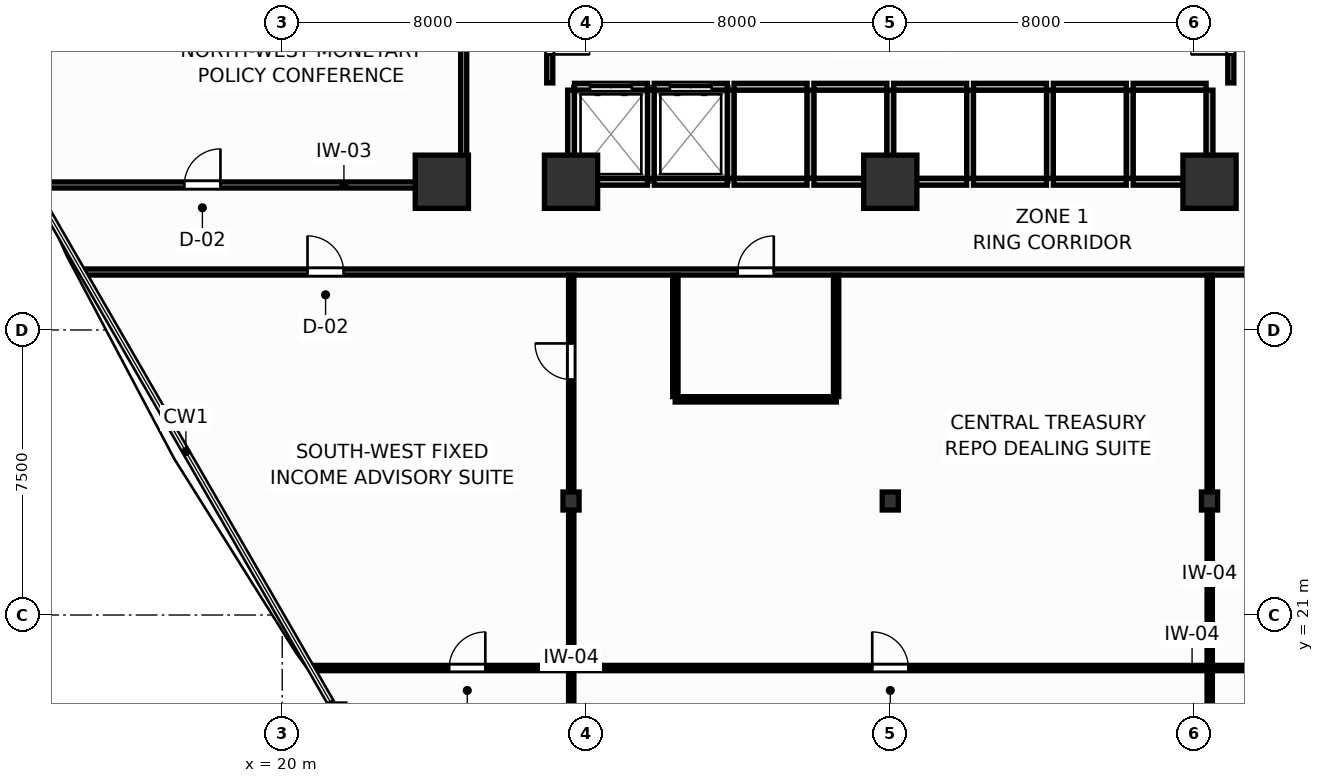
"""IFC4 building model, lengths in metres.
Left out: names, types, materials, properties, quantities, classifications, styles, units other than length and angle.
Written with IfcOpenShell. Run it as: python <this file> out.ifc"""

import sys

from ifc_helpers import new_model, si_unit, direction, frame, frame_2d, origin, origin_2d, place, context, subcontext, project, spatial, rectangle, i_section, extrude, source, transform, mapped, element, fill, save


model = new_model("IFC4")
c1 = context("Model", 3, precision=1e-05, world=origin(), true_north=direction((0.0, 1.0)))
c2 = subcontext(c1, "Body", "Model", "MODEL_VIEW")
j1 = project(units=[si_unit("LENGTHUNIT", "METRE"), si_unit("PLANEANGLEUNIT", "RADIAN")], contexts=[c1])
p1 = place(None, origin())
s1 = spatial("IfcSite", under=j1, at=p1, CompositionType="ELEMENT")
p2 = place(p1, origin())
s2 = spatial("IfcBuilding", under=s1, at=p2, CompositionType="ELEMENT")
p3 = place(p2, frame((0.0, 0.0, 43.5)))
s3 = spatial("IfcBuildingStorey", under=s2, at=p3, CompositionType="ELEMENT", Elevation=43.5)
m1 = source(origin(), c2, "Body", "SweptSolid", [
    extrude(rectangle(XDim=1.4, YDim=1.4, at=origin_2d()), origin(), (0.0, 0.0, 1.0), 3.9),
])
for number, where, z_axis, x_axis in (
    (1, (27.6, 32.4, 0.0), (0.0, 0.0, 1.0), (1.0, 0.0, 0.0)),
    (2, (44.4, 32.4, 0.0), (0.0, 0.0, 1.0), (1.0, 0.0, 0.0)),
    (3, (36.0, 32.4, 0.0), (0.0, 0.0, 1.0), (1.0, 0.0, 0.0)),
    (4, (24.2, 32.4, 0.0), (0.0, 0.0, 1.0), (1.0, 0.0, 0.0)),
):
    element("IfcColumn", number, at=place(p3, frame(where, z_axis=z_axis, x_axis=x_axis)), inside=s3, PredefinedType="COLUMN", context=c2, shape_type="MappedRepresentation", body=[
        mapped(m1, transform((0.0, 0.0, 0.0), scale=1.0)),
    ])
m2 = source(origin(), c2, "Body", "SweptSolid", [
    extrude(i_section(OverallWidth=0.424, OverallDepth=0.474, WebThickness=0.045, FlangeThickness=0.072, FilletRadius=0.015, at=origin_2d()), origin(), (0.0, 0.0, 1.0), 3.9),
])
for number, where, z_axis, x_axis in (
    (5, (27.6, 24.0, 0.0), (0.0, 0.0, 1.0), (1.0, 0.0, 0.0)),
    (6, (44.4, 24.0, 0.0), (0.0, 0.0, 1.0), (1.0, 0.0, 0.0)),
    (7, (36.0, 24.0, 0.0), (0.0, 0.0, 1.0), (1.0, 0.0, 0.0)),
):
    element("IfcColumn", number, at=place(p3, frame(where, z_axis=z_axis, x_axis=x_axis)), inside=s3, PredefinedType="COLUMN", context=c2, shape_type="MappedRepresentation", body=[
        mapped(m2, transform((0.0, 0.0, 0.0), scale=1.0)),
    ])
p4 = place(p3, frame((27.69, 34.9, 0.0), z_axis=(0.0, 0.0, 1.0), x_axis=(1.0, 0.0, 0.0)))
e8 = element("IfcWall", 8, at=p4, inside=s3, PredefinedType="PARTITIONING", context=c2, shape_type="SweptSolid", body=[
    extrude(rectangle(XDim=1.92, YDim=0.18, at=frame_2d((0.96, 0.0))), origin(), (0.0, 0.0, 1.0), 3.68),
])
p5 = place(p4, frame((0.41, 0.0, 0.0)))
e9 = element("IfcOpeningElement", 9, at=p5, cuts=e8, PredefinedType="OPENING", context=c2, shape_type="SweptSolid", body=[
    extrude(rectangle(XDim=1.1, YDim=2.1, at=frame_2d((0.55, 1.05))), frame((0.0, 0.1, 0.0), z_axis=(0.0, -1.0, 0.0), x_axis=(1.0, 0.0, 0.0)), (0.0, 0.0, 1.0), 0.2),
])
p6 = place(p3, frame((27.69, 32.4, 0.0), z_axis=(0.0, 0.0, 1.0), x_axis=(1.0, 0.0, 0.0)))
e10 = element("IfcWall", 10, at=p6, inside=s3, PredefinedType="PARTITIONING", context=c2, shape_type="SweptSolid", body=[
    extrude(rectangle(XDim=1.92, YDim=0.18, at=frame_2d((0.96, 0.0))), origin(), (0.0, 0.0, 1.0), 2.24),
])
p7 = place(p3, frame((27.6, 32.49, 0.0), z_axis=(0.0, 0.0, 1.0), x_axis=(0.0, 1.0, 0.0)))
e11 = element("IfcWall", 11, at=p7, inside=s3, PredefinedType="PARTITIONING", context=c2, shape_type="SweptSolid", body=[
    extrude(rectangle(XDim=2.32, YDim=0.18, at=frame_2d((1.16, 0.0))), origin(), (0.0, 0.0, 1.0), 3.68),
])
p8 = place(p3, frame((29.79, 34.9, 0.0), z_axis=(0.0, 0.0, 1.0), x_axis=(1.0, 0.0, 0.0)))
e12 = element("IfcWall", 12, at=p8, inside=s3, PredefinedType="PARTITIONING", context=c2, shape_type="SweptSolid", body=[
    extrude(rectangle(XDim=1.92, YDim=0.18, at=frame_2d((0.96, 0.0))), origin(), (0.0, 0.0, 1.0), 3.68),
])
p9 = place(p8, frame((0.41, 0.0, 0.0)))
e13 = element("IfcOpeningElement", 13, at=p9, cuts=e12, PredefinedType="OPENING", context=c2, shape_type="SweptSolid", body=[
    extrude(rectangle(XDim=1.1, YDim=2.1, at=frame_2d((0.55, 1.05))), frame((0.0, 0.1, 0.0), z_axis=(0.0, -1.0, 0.0), x_axis=(1.0, 0.0, 0.0)), (0.0, 0.0, 1.0), 0.2),
])
p10 = place(p3, frame((29.79, 32.4, 0.0), z_axis=(0.0, 0.0, 1.0), x_axis=(1.0, 0.0, 0.0)))
e14 = element("IfcWall", 14, at=p10, inside=s3, PredefinedType="PARTITIONING", context=c2, shape_type="SweptSolid", body=[
    extrude(rectangle(XDim=1.92, YDim=0.18, at=frame_2d((0.96, 0.0))), origin(), (0.0, 0.0, 1.0), 2.24),
])
p11 = place(p3, frame((29.7, 32.49, 0.0), z_axis=(0.0, 0.0, 1.0), x_axis=(0.0, 1.0, 0.0)))
e15 = element("IfcWall", 15, at=p11, inside=s3, PredefinedType="PARTITIONING", context=c2, shape_type="SweptSolid", body=[
    extrude(rectangle(XDim=2.32, YDim=0.18, at=frame_2d((1.16, 0.0))), origin(), (0.0, 0.0, 1.0), 3.68),
])
p12 = place(p3, frame((31.89, 34.9, 0.0), z_axis=(0.0, 0.0, 1.0), x_axis=(1.0, 0.0, 0.0)))
e16 = element("IfcWall", 16, at=p12, inside=s3, PredefinedType="PARTITIONING", context=c2, shape_type="SweptSolid", body=[
    extrude(rectangle(XDim=1.92, YDim=0.18, at=frame_2d((0.96, 0.0))), origin(), (0.0, 0.0, 1.0), 3.68),
])
p13 = place(p3, frame((31.89, 32.4, 0.0), z_axis=(0.0, 0.0, 1.0), x_axis=(1.0, 0.0, 0.0)))
e17 = element("IfcWall", 17, at=p13, inside=s3, PredefinedType="PARTITIONING", context=c2, shape_type="SweptSolid", body=[
    extrude(rectangle(XDim=1.92, YDim=0.18, at=frame_2d((0.96, 0.0))), origin(), (0.0, 0.0, 1.0), 2.24),
])
p14 = place(p3, frame((31.8, 32.49, 0.0), z_axis=(0.0, 0.0, 1.0), x_axis=(0.0, 1.0, 0.0)))
e18 = element("IfcWall", 18, at=p14, inside=s3, PredefinedType="PARTITIONING", context=c2, shape_type="SweptSolid", body=[
    extrude(rectangle(XDim=2.32, YDim=0.18, at=frame_2d((1.16, 0.0))), origin(), (0.0, 0.0, 1.0), 3.68),
])
p15 = place(p3, frame((33.99, 34.9, 0.0), z_axis=(0.0, 0.0, 1.0), x_axis=(1.0, 0.0, 0.0)))
e19 = element("IfcWall", 19, at=p15, inside=s3, PredefinedType="PARTITIONING", context=c2, shape_type="SweptSolid", body=[
    extrude(rectangle(XDim=1.92, YDim=0.18, at=frame_2d((0.96, 0.0))), origin(), (0.0, 0.0, 1.0), 3.68),
])
p16 = place(p3, frame((33.99, 32.4, 0.0), z_axis=(0.0, 0.0, 1.0), x_axis=(1.0, 0.0, 0.0)))
e20 = element("IfcWall", 20, at=p16, inside=s3, PredefinedType="PARTITIONING", context=c2, shape_type="SweptSolid", body=[
    extrude(rectangle(XDim=1.92, YDim=0.18, at=frame_2d((0.96, 0.0))), origin(), (0.0, 0.0, 1.0), 2.24),
])
p17 = place(p3, frame((33.9, 32.49, 0.0), z_axis=(0.0, 0.0, 1.0), x_axis=(0.0, 1.0, 0.0)))
e21 = element("IfcWall", 21, at=p17, inside=s3, PredefinedType="PARTITIONING", context=c2, shape_type="SweptSolid", body=[
    extrude(rectangle(XDim=2.32, YDim=0.18, at=frame_2d((1.16, 0.0))), origin(), (0.0, 0.0, 1.0), 3.68),
])
p18 = place(p3, frame((36.09, 34.9, 0.0), z_axis=(0.0, 0.0, 1.0), x_axis=(1.0, 0.0, 0.0)))
e22 = element("IfcWall", 22, at=p18, inside=s3, PredefinedType="PARTITIONING", context=c2, shape_type="SweptSolid", body=[
    extrude(rectangle(XDim=1.92, YDim=0.18, at=frame_2d((0.96, 0.0))), origin(), (0.0, 0.0, 1.0), 3.68),
])
p19 = place(p3, frame((36.09, 32.4, 0.0), z_axis=(0.0, 0.0, 1.0), x_axis=(1.0, 0.0, 0.0)))
e23 = element("IfcWall", 23, at=p19, inside=s3, PredefinedType="PARTITIONING", context=c2, shape_type="SweptSolid", body=[
    extrude(rectangle(XDim=1.92, YDim=0.18, at=frame_2d((0.96, 0.0))), origin(), (0.0, 0.0, 1.0), 2.24),
])
p20 = place(p3, frame((36.0, 32.49, 0.0), z_axis=(0.0, 0.0, 1.0), x_axis=(0.0, 1.0, 0.0)))
e24 = element("IfcWall", 24, at=p20, inside=s3, PredefinedType="PARTITIONING", context=c2, shape_type="SweptSolid", body=[
    extrude(rectangle(XDim=2.32, YDim=0.18, at=frame_2d((1.16, 0.0))), origin(), (0.0, 0.0, 1.0), 3.68),
])
p21 = place(p3, frame((38.19, 34.9, 0.0), z_axis=(0.0, 0.0, 1.0), x_axis=(1.0, 0.0, 0.0)))
e25 = element("IfcWall", 25, at=p21, inside=s3, PredefinedType="PARTITIONING", context=c2, shape_type="SweptSolid", body=[
    extrude(rectangle(XDim=1.92, YDim=0.18, at=frame_2d((0.96, 0.0))), origin(), (0.0, 0.0, 1.0), 3.68),
])
p22 = place(p3, frame((38.19, 32.4, 0.0), z_axis=(0.0, 0.0, 1.0), x_axis=(1.0, 0.0, 0.0)))
e26 = element("IfcWall", 26, at=p22, inside=s3, PredefinedType="PARTITIONING", context=c2, shape_type="SweptSolid", body=[
    extrude(rectangle(XDim=1.92, YDim=0.18, at=frame_2d((0.96, 0.0))), origin(), (0.0, 0.0, 1.0), 2.24),
])
p23 = place(p3, frame((38.1, 32.49, 0.0), z_axis=(0.0, 0.0, 1.0), x_axis=(0.0, 1.0, 0.0)))
e27 = element("IfcWall", 27, at=p23, inside=s3, PredefinedType="PARTITIONING", context=c2, shape_type="SweptSolid", body=[
    extrude(rectangle(XDim=2.32, YDim=0.18, at=frame_2d((1.16, 0.0))), origin(), (0.0, 0.0, 1.0), 3.68),
])
p24 = place(p3, frame((40.29, 34.9, 0.0), z_axis=(0.0, 0.0, 1.0), x_axis=(1.0, 0.0, 0.0)))
e28 = element("IfcWall", 28, at=p24, inside=s3, PredefinedType="PARTITIONING", context=c2, shape_type="SweptSolid", body=[
    extrude(rectangle(XDim=1.92, YDim=0.18, at=frame_2d((0.96, 0.0))), origin(), (0.0, 0.0, 1.0), 3.68),
])
p25 = place(p3, frame((40.29, 32.4, 0.0), z_axis=(0.0, 0.0, 1.0), x_axis=(1.0, 0.0, 0.0)))
e29 = element("IfcWall", 29, at=p25, inside=s3, PredefinedType="PARTITIONING", context=c2, shape_type="SweptSolid", body=[
    extrude(rectangle(XDim=1.92, YDim=0.18, at=frame_2d((0.96, 0.0))), origin(), (0.0, 0.0, 1.0), 2.24),
])
p26 = place(p3, frame((40.2, 32.49, 0.0), z_axis=(0.0, 0.0, 1.0), x_axis=(0.0, 1.0, 0.0)))
e30 = element("IfcWall", 30, at=p26, inside=s3, PredefinedType="PARTITIONING", context=c2, shape_type="SweptSolid", body=[
    extrude(rectangle(XDim=2.32, YDim=0.18, at=frame_2d((1.16, 0.0))), origin(), (0.0, 0.0, 1.0), 3.68),
])
p27 = place(p3, frame((42.39, 34.9, 0.0), z_axis=(0.0, 0.0, 1.0), x_axis=(1.0, 0.0, 0.0)))
e31 = element("IfcWall", 31, at=p27, inside=s3, PredefinedType="PARTITIONING", context=c2, shape_type="SweptSolid", body=[
    extrude(rectangle(XDim=1.92, YDim=0.18, at=frame_2d((0.96, 0.0))), origin(), (0.0, 0.0, 1.0), 3.68),
])
p28 = place(p3, frame((42.39, 32.4, 0.0), z_axis=(0.0, 0.0, 1.0), x_axis=(1.0, 0.0, 0.0)))
e32 = element("IfcWall", 32, at=p28, inside=s3, PredefinedType="PARTITIONING", context=c2, shape_type="SweptSolid", body=[
    extrude(rectangle(XDim=1.92, YDim=0.18, at=frame_2d((0.96, 0.0))), origin(), (0.0, 0.0, 1.0), 2.24),
])
for number, where, z_axis, x_axis in (
    (33, (42.3, 32.49, 0.0), (0.0, 0.0, 1.0), (0.0, 1.0, 0.0)),
    (34, (44.4, 32.49, 0.0), (0.0, 0.0, 1.0), (0.0, 1.0, 0.0)),
):
    element("IfcWall", number, at=place(p3, frame(where, z_axis=z_axis, x_axis=x_axis)), inside=s3, PredefinedType="PARTITIONING", context=c2, shape_type="SweptSolid", body=[
        extrude(rectangle(XDim=2.32, YDim=0.18, at=frame_2d((1.16, 0.0))), origin(), (0.0, 0.0, 1.0), 3.68),
    ])
p29 = place(p3, frame((27.04, 35.0, 0.0), z_axis=(0.0, 0.0, 1.0), x_axis=(0.0, 1.0, 0.0)))
e35 = element("IfcWall", 35, at=p29, inside=s3, PredefinedType="PARTITIONING", context=c2, shape_type="SweptSolid", body=[
    extrude(rectangle(XDim=2.65, YDim=0.16, at=frame_2d((1.325, 0.0))), origin(), (0.0, 0.0, 1.0), 3.68),
])
p30 = place(p29, frame((0.75, 0.0, 0.0)))
e36 = element("IfcOpeningElement", 36, at=p30, cuts=e35, PredefinedType="OPENING", context=c2, shape_type="SweptSolid", body=[
    extrude(rectangle(XDim=1.05, YDim=2.1, at=frame_2d((0.525, 1.05))), frame((0.0, 0.09, 0.0), z_axis=(0.0, -1.0, 0.0), x_axis=(1.0, 0.0, 0.0)), (0.0, 0.0, 1.0), 0.18),
])
p31 = place(p3, frame((44.96, 35.0, 0.0), z_axis=(0.0, 0.0, 1.0), x_axis=(0.0, 1.0, 0.0)))
e37 = element("IfcWall", 37, at=p31, inside=s3, PredefinedType="PARTITIONING", context=c2, shape_type="SweptSolid", body=[
    extrude(rectangle(XDim=2.65, YDim=0.16, at=frame_2d((1.325, 0.0))), origin(), (0.0, 0.0, 1.0), 3.68),
])
p32 = place(p31, frame((0.75, 0.0, 0.0)))
e38 = element("IfcOpeningElement", 38, at=p32, cuts=e37, PredefinedType="OPENING", context=c2, shape_type="SweptSolid", body=[
    extrude(rectangle(XDim=1.05, YDim=2.1, at=frame_2d((0.525, 1.05))), frame((0.0, 0.09, 0.0), z_axis=(0.0, -1.0, 0.0), x_axis=(1.0, 0.0, 0.0)), (0.0, 0.0, 1.0), 0.18),
])
p33 = place(p3, frame((14.757, 30.025, 0.0), z_axis=(0.0, 0.0, 1.0), x_axis=(1.0, 0.0, 0.0)))
e39 = element("IfcWall", 39, at=p33, inside=s3, PredefinedType="PARTITIONING", context=c2, shape_type="SweptSolid", body=[
    extrude(rectangle(XDim=42.485, YDim=0.16, at=frame_2d((21.243, 0.0))), origin(), (0.0, 0.0, 1.0), 3.68),
])
p34 = place(p33, frame((17.228, 0.0, 0.0)))
e40 = element("IfcOpeningElement", 40, at=p34, cuts=e39, PredefinedType="OPENING", context=c2, shape_type="SweptSolid", body=[
    extrude(rectangle(XDim=0.95, YDim=2.05, at=frame_2d((0.475, 1.025))), frame((0.0, 0.09, 0.0), z_axis=(0.0, -1.0, 0.0), x_axis=(1.0, 0.0, 0.0)), (0.0, 0.0, 1.0), 0.18),
])
p35 = place(p33, frame((5.908, 0.0, 0.0)))
e41 = element("IfcOpeningElement", 41, at=p35, cuts=e39, PredefinedType="OPENING", context=c2, shape_type="SweptSolid", body=[
    extrude(rectangle(XDim=0.95, YDim=2.05, at=frame_2d((0.475, 1.025))), frame((0.0, 0.09, 0.0), z_axis=(0.0, -1.0, 0.0), x_axis=(1.0, 0.0, 0.0)), (0.0, 0.0, 1.0), 0.18),
])
p36 = place(p33, frame((35.199, 0.0, 0.0)))
e42 = element("IfcOpeningElement", 42, at=p36, cuts=e39, PredefinedType="OPENING", context=c2, shape_type="SweptSolid", body=[
    extrude(rectangle(XDim=0.95, YDim=2.05, at=frame_2d((0.475, 1.025))), frame((0.0, 0.09, 0.0), z_axis=(0.0, -1.0, 0.0), x_axis=(1.0, 0.0, 0.0)), (0.0, 0.0, 1.0), 0.18),
])
p37 = place(p3, frame((24.775, 32.31, 0.0), z_axis=(0.0, 0.0, 1.0), x_axis=(0.0, 1.0, 0.0)))
e43 = element("IfcWall", 43, at=p37, inside=s3, PredefinedType="PARTITIONING", context=c2, shape_type="SweptSolid", body=[
    extrude(rectangle(XDim=24.519, YDim=0.16, at=frame_2d((12.26, 0.0))), origin(), (0.0, 0.0, 1.0), 3.68),
])
p38 = place(p37, frame((11.654, 0.0, 0.0)))
e44 = element("IfcOpeningElement", 44, at=p38, cuts=e43, PredefinedType="OPENING", context=c2, shape_type="SweptSolid", body=[
    extrude(rectangle(XDim=0.95, YDim=2.05, at=frame_2d((0.475, 1.025))), frame((0.0, 0.09, 0.0), z_axis=(0.0, -1.0, 0.0), x_axis=(1.0, 0.0, 0.0)), (0.0, 0.0, 1.0), 0.18),
])
p39 = place(p3, frame((13.463, 32.315, 0.0), z_axis=(0.0, 0.0, 1.0), x_axis=(1.0, 0.0, 0.0)))
e45 = element("IfcWall", 45, at=p39, inside=s3, PredefinedType="PARTITIONING", context=c2, shape_type="SweptSolid", body=[
    extrude(rectangle(XDim=11.23, YDim=0.16, at=frame_2d((5.615, 0.0))), origin(), (0.0, 0.0, 1.0), 2.24),
])
p40 = place(p39, frame((3.962, 0.0, 0.0)))
e46 = element("IfcOpeningElement", 46, at=p40, cuts=e45, PredefinedType="OPENING", context=c2, shape_type="SweptSolid", body=[
    extrude(rectangle(XDim=0.95, YDim=2.05, at=frame_2d((0.475, 1.025))), frame((0.0, 0.09, 0.0), z_axis=(0.0, -1.0, 0.0), x_axis=(1.0, 0.0, 0.0)), (0.0, 0.0, 1.0), 0.18),
])
p41 = place(p3, frame((20.773, 19.605, 0.0), z_axis=(0.0, 0.0, 1.0), x_axis=(1.0, 0.0, 0.0)))
e47 = element("IfcWall", 47, at=p41, inside=s3, PredefinedType="PARTITIONING", context=c2, shape_type="SweptSolid", body=[
    extrude(rectangle(XDim=30.454, YDim=0.14, at=frame_2d((15.227, 0.0))), origin(), (0.0, 0.0, 1.0), 3.68),
])
p42 = place(p41, frame((3.621, 0.0, 0.0)))
e48 = element("IfcOpeningElement", 48, at=p42, cuts=e47, PredefinedType="OPENING", context=c2, shape_type="SweptSolid", body=[
    extrude(rectangle(XDim=0.95, YDim=2.05, at=frame_2d((0.475, 1.025))), frame((0.0, 0.08, 0.0), z_axis=(0.0, -1.0, 0.0), x_axis=(1.0, 0.0, 0.0)), (0.0, 0.0, 1.0), 0.16),
])
p43 = place(p41, frame((14.752, 0.0, 0.0)))
e49 = element("IfcOpeningElement", 49, at=p43, cuts=e47, PredefinedType="OPENING", context=c2, shape_type="SweptSolid", body=[
    extrude(rectangle(XDim=0.95, YDim=2.05, at=frame_2d((0.475, 1.025))), frame((0.0, 0.08, 0.0), z_axis=(0.0, -1.0, 0.0), x_axis=(1.0, 0.0, 0.0)), (0.0, 0.0, 1.0), 0.16),
])
p44 = place(p3, frame((27.605, 10.971, 0.0), z_axis=(0.0, 0.0, 1.0), x_axis=(0.0, 1.0, 0.0)))
e50 = element("IfcWall", 50, at=p44, inside=s3, PredefinedType="PARTITIONING", context=c2, shape_type="SweptSolid", body=[
    extrude(rectangle(XDim=18.972, YDim=0.14, at=frame_2d((9.486, 0.0))), origin(), (0.0, 0.0, 1.0), 2.24),
])
p45 = place(p44, frame((16.225, 0.0, 0.0)))
e51 = element("IfcOpeningElement", 51, at=p45, cuts=e50, PredefinedType="OPENING", context=c2, shape_type="SweptSolid", body=[
    extrude(rectangle(XDim=0.95, YDim=2.05, at=frame_2d((0.475, 1.025))), frame((0.0, 0.08, 0.0), z_axis=(0.0, -1.0, 0.0), x_axis=(1.0, 0.0, 0.0)), (0.0, 0.0, 1.0), 0.16),
])
p46 = place(p3, frame((44.405, 10.983, 0.0), z_axis=(0.0, 0.0, 1.0), x_axis=(0.0, 1.0, 0.0)))
e52 = element("IfcWall", 52, at=p46, inside=s3, PredefinedType="PARTITIONING", context=c2, shape_type="SweptSolid", body=[
    extrude(rectangle(XDim=18.96, YDim=0.14, at=frame_2d((9.48, 0.0))), origin(), (0.0, 0.0, 1.0), 2.24),
])
p47 = place(p46, frame((3.847, 0.0, 0.0)))
e53 = element("IfcOpeningElement", 53, at=p47, cuts=e52, PredefinedType="OPENING", context=c2, shape_type="SweptSolid", body=[
    extrude(rectangle(XDim=0.95, YDim=2.05, at=frame_2d((0.475, 1.025))), frame((0.0, 0.08, 0.0), z_axis=(0.0, -1.0, 0.0), x_axis=(1.0, 0.0, 0.0)), (0.0, 0.0, 1.0), 0.16),
])
p48 = place(p3, frame((30.34, 26.675, 0.0), z_axis=(0.0, 0.0, 1.0), x_axis=(1.0, 0.0, 0.0)))
e54 = element("IfcWall", 54, at=p48, inside=s3, PredefinedType="PARTITIONING", context=c2, shape_type="SweptSolid", body=[
    extrude(rectangle(XDim=4.24, YDim=0.14, at=frame_2d((2.12, 0.0))), origin(), (0.0, 0.0, 1.0), 3.68),
])
for number, where, z_axis, x_axis in (
    (55, (34.575, 26.747, 0.0), (0.0, 0.0, 1.0), (0.0, 1.0, 0.0)),
    (56, (30.345, 26.747, 0.0), (0.0, 0.0, 1.0), (0.0, 1.0, 0.0)),
):
    element("IfcWall", number, at=place(p3, frame(where, z_axis=z_axis, x_axis=x_axis)), inside=s3, PredefinedType="PARTITIONING", context=c2, shape_type="SweptSolid", body=[
        extrude(rectangle(XDim=3.196, YDim=0.14, at=frame_2d((1.598, 0.0))), origin(), (0.0, 0.0, 1.0), 3.68),
    ])
p49 = place(p5, origin())
e57 = element("IfcDoor", 57, at=p49, inside=s3, OperationType="DOUBLE_DOOR_SLIDING", PredefinedType="DOOR", context=c2, shape_type="SweptSolid", body=[
    extrude(rectangle(XDim=1.1, YDim=2.1, at=frame_2d((0.55, 1.05))), frame((0.0, 0.025, 0.0), z_axis=(0.0, -1.0, 0.0), x_axis=(1.0, 0.0, 0.0)), (0.0, 0.0, 1.0), 0.05),
])
fill(e9, e57)
p50 = place(p9, origin())
e58 = element("IfcDoor", 58, at=p50, inside=s3, OperationType="DOUBLE_DOOR_SLIDING", PredefinedType="DOOR", context=c2, shape_type="SweptSolid", body=[
    extrude(rectangle(XDim=1.1, YDim=2.1, at=frame_2d((0.55, 1.05))), frame((0.0, 0.025, 0.0), z_axis=(0.0, -1.0, 0.0), x_axis=(1.0, 0.0, 0.0)), (0.0, 0.0, 1.0), 0.05),
])
fill(e13, e58)
p51 = place(p30, frame((1.05, 0.0, 0.0), z_axis=(0.0, 0.0, 1.0), x_axis=(-1.0, 0.0, 0.0)))
e59 = element("IfcDoor", 59, at=p51, inside=s3, OperationType="SINGLE_SWING_RIGHT", PredefinedType="DOOR", context=c2, shape_type="SweptSolid", body=[
    extrude(rectangle(XDim=1.05, YDim=2.1, at=frame_2d((0.525, 1.05))), frame((0.0, 0.025, 0.0), z_axis=(0.0, -1.0, 0.0), x_axis=(1.0, 0.0, 0.0)), (0.0, 0.0, 1.0), 0.05),
])
fill(e36, e59)
p52 = place(p32, origin())
e60 = element("IfcDoor", 60, at=p52, inside=s3, OperationType="SINGLE_SWING_LEFT", PredefinedType="DOOR", context=c2, shape_type="SweptSolid", body=[
    extrude(rectangle(XDim=1.05, YDim=2.1, at=frame_2d((0.525, 1.05))), frame((0.0, 0.025, 0.0), z_axis=(0.0, -1.0, 0.0), x_axis=(1.0, 0.0, 0.0)), (0.0, 0.0, 1.0), 0.05),
])
fill(e38, e60)
p53 = place(p34, origin())
e61 = element("IfcDoor", 61, at=p53, inside=s3, OperationType="SINGLE_SWING_RIGHT", PredefinedType="DOOR", context=c2, shape_type="SweptSolid", body=[
    extrude(rectangle(XDim=0.95, YDim=2.05, at=frame_2d((0.475, 1.025))), frame((0.0, 0.025, 0.0), z_axis=(0.0, -1.0, 0.0), x_axis=(1.0, 0.0, 0.0)), (0.0, 0.0, 1.0), 0.05),
])
fill(e40, e61)
p54 = place(p35, origin())
e62 = element("IfcDoor", 62, at=p54, inside=s3, OperationType="SINGLE_SWING_LEFT", PredefinedType="DOOR", context=c2, shape_type="SweptSolid", body=[
    extrude(rectangle(XDim=0.95, YDim=2.05, at=frame_2d((0.475, 1.025))), frame((0.0, 0.025, 0.0), z_axis=(0.0, -1.0, 0.0), x_axis=(1.0, 0.0, 0.0)), (0.0, 0.0, 1.0), 0.05),
])
fill(e41, e62)
p55 = place(p40, origin())
e63 = element("IfcDoor", 63, at=p55, inside=s3, OperationType="SINGLE_SWING_RIGHT", PredefinedType="DOOR", context=c2, shape_type="SweptSolid", body=[
    extrude(rectangle(XDim=0.95, YDim=2.05, at=frame_2d((0.475, 1.025))), frame((0.0, 0.025, 0.0), z_axis=(0.0, -1.0, 0.0), x_axis=(1.0, 0.0, 0.0)), (0.0, 0.0, 1.0), 0.05),
])
fill(e46, e63)
p56 = place(p42, origin())
e64 = element("IfcDoor", 64, at=p56, inside=s3, OperationType="SINGLE_SWING_RIGHT", PredefinedType="DOOR", context=c2, shape_type="SweptSolid", body=[
    extrude(rectangle(XDim=0.95, YDim=2.05, at=frame_2d((0.475, 1.025))), frame((0.0, 0.025, 0.0), z_axis=(0.0, -1.0, 0.0), x_axis=(1.0, 0.0, 0.0)), (0.0, 0.0, 1.0), 0.05),
])
fill(e48, e64)
p57 = place(p43, origin())
e65 = element("IfcDoor", 65, at=p57, inside=s3, OperationType="SINGLE_SWING_LEFT", PredefinedType="DOOR", context=c2, shape_type="SweptSolid", body=[
    extrude(rectangle(XDim=0.95, YDim=2.05, at=frame_2d((0.475, 1.025))), frame((0.0, 0.025, 0.0), z_axis=(0.0, -1.0, 0.0), x_axis=(1.0, 0.0, 0.0)), (0.0, 0.0, 1.0), 0.05),
])
fill(e49, e65)
p58 = place(p45, origin())
e66 = element("IfcDoor", 66, at=p58, inside=s3, OperationType="SINGLE_SWING_RIGHT", PredefinedType="DOOR", context=c2, shape_type="SweptSolid", body=[
    extrude(rectangle(XDim=0.95, YDim=2.05, at=frame_2d((0.475, 1.025))), frame((0.0, 0.025, 0.0), z_axis=(0.0, -1.0, 0.0), x_axis=(1.0, 0.0, 0.0)), (0.0, 0.0, 1.0), 0.05),
])
fill(e51, e66)
save(model, sys.argv[1])
